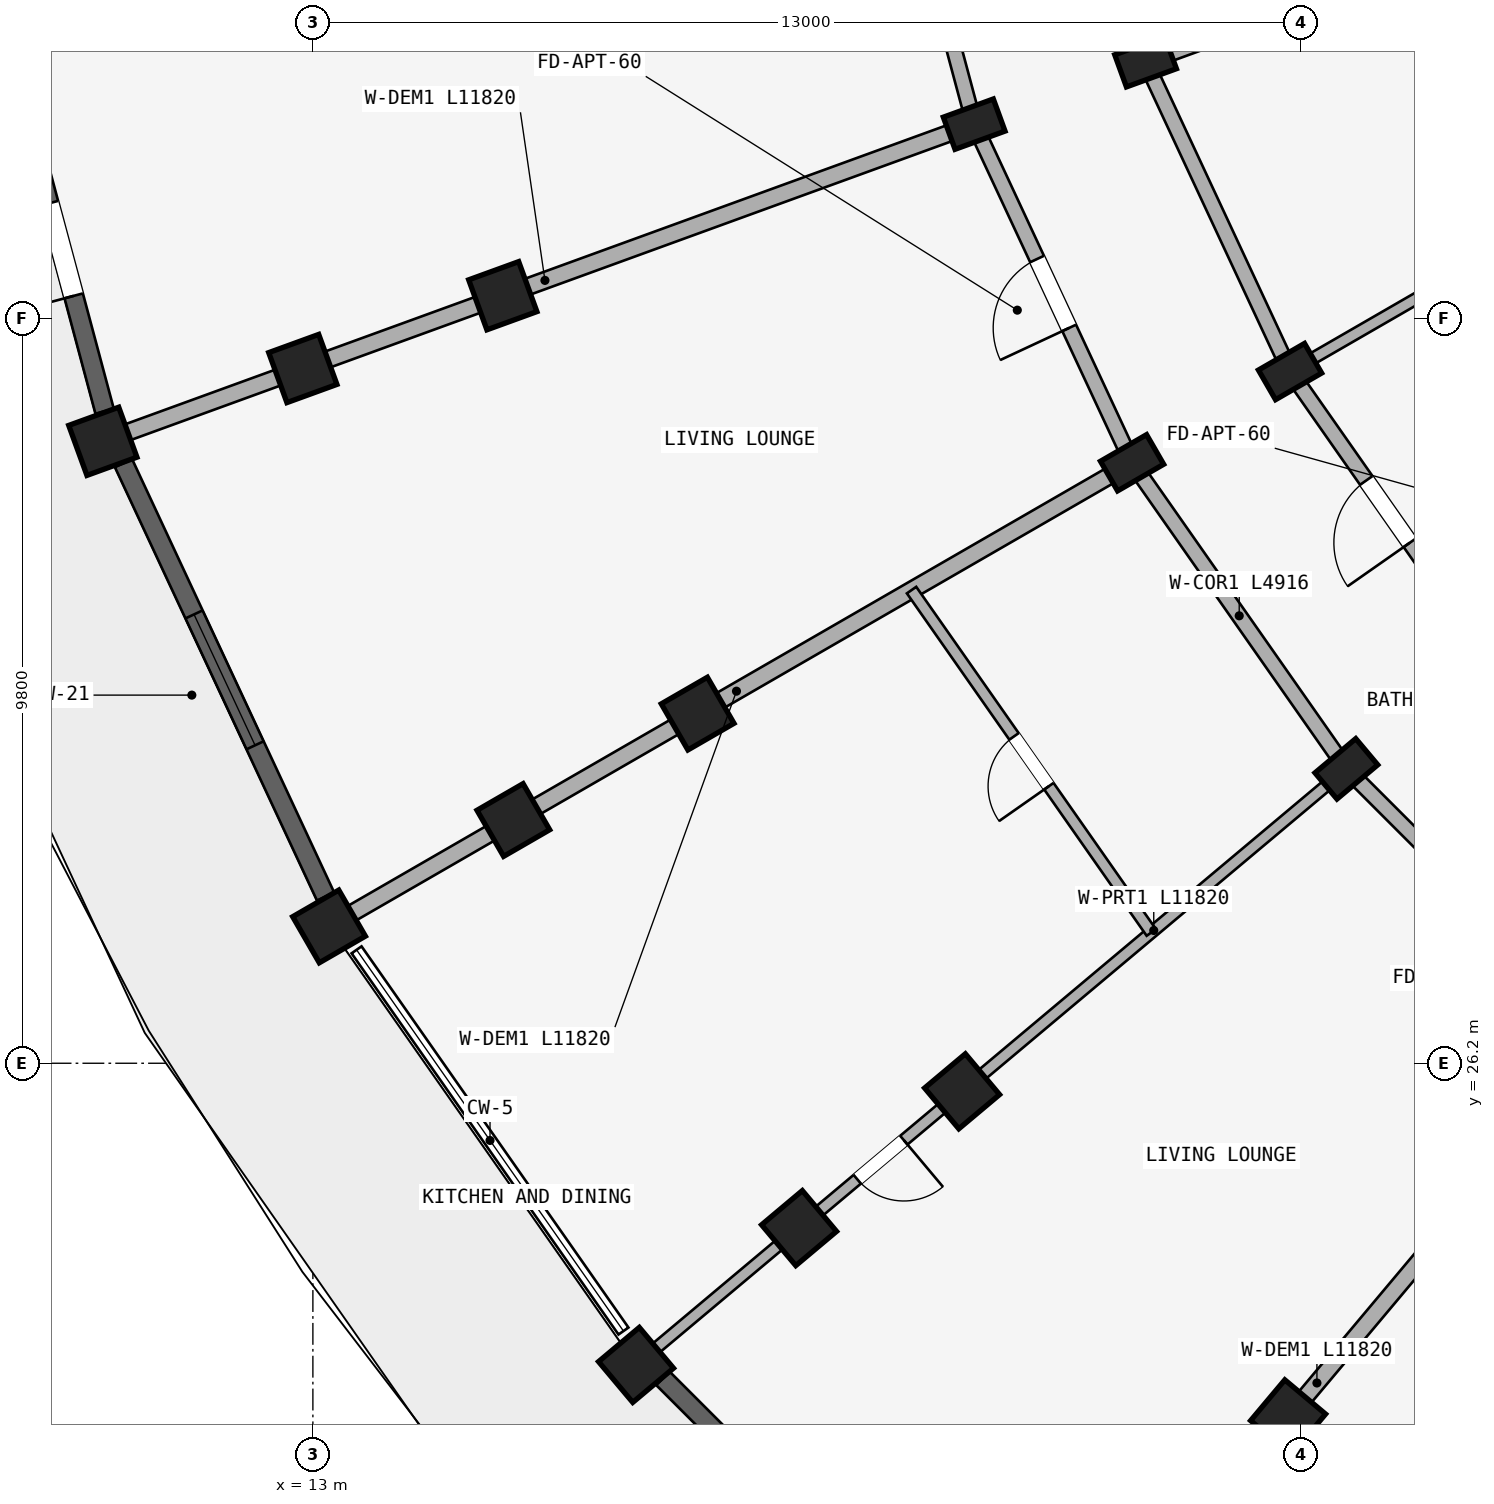
"""IFC4 building model, lengths in metres.
Left out: names, types, materials, properties, quantities, classifications, styles, units other than length and angle.
Written with IfcOpenShell. Run it as: python <this file> out.ifc"""

import sys

from ifc_helpers import new_model, si_unit, direction, frame, frame_2d, origin, origin_2d, place, context, subcontext, project, spatial, rectangle, extrude, element, fill, save


model = new_model("IFC4")
c1 = context("Model", 3, precision=1e-05, world=origin(), true_north=direction((0.0, 1.0)))
c2 = subcontext(c1, "Body", "Model", "MODEL_VIEW")
j1 = project(units=[si_unit("LENGTHUNIT", "METRE"), si_unit("PLANEANGLEUNIT", "RADIAN")], contexts=[c1])
p1 = place(None, origin())
s1 = spatial("IfcSite", under=j1, at=p1, CompositionType="ELEMENT")
p2 = place(p1, origin())
s2 = spatial("IfcBuilding", under=s1, at=p2, CompositionType="ELEMENT")
p3 = place(p2, frame((0.0, 0.0, 24.45)))
s3 = spatial("IfcBuildingStorey", under=s2, at=p3, CompositionType="ELEMENT", Elevation=24.45)
p4 = place(p3, frame((25.831, 21.542, 0.0), z_axis=(0.0, 0.0, 1.0), x_axis=(-0.766044443119, 0.642787609687, 0.0)))
e1 = element("IfcColumn", 1, at=p4, inside=s3, PredefinedType="COLUMN", context=c2, shape_type="SweptSolid", body=[
    extrude(rectangle(XDim=0.7, YDim=0.7, at=origin_2d()), origin(), (0.0, 0.0, 1.0), 2.93),
])
p5 = place(p3, frame((26.598, 30.073, 0.0), z_axis=(0.0, 0.0, 1.0), x_axis=(-0.642787609687, 0.766044443119, 0.0)))
e2 = element("IfcColumn", 2, at=p5, inside=s3, PredefinedType="COLUMN", context=c2, shape_type="SweptSolid", body=[
    extrude(rectangle(XDim=0.45, YDim=0.7, at=origin_2d()), origin(), (0.0, 0.0, 1.0), 2.93),
])
for number, where, z_axis, x_axis in (
    (3, (21.542, 25.831, 0.0), (0.0, 0.0, 1.0), (-0.643, 0.766, 0.0)),
    (4, (19.397, 24.031, 0.0), (0.0, 0.0, 1.0), (-0.643, 0.766, 0.0)),
):
    element("IfcColumn", number, at=place(p3, frame(where, z_axis=z_axis, x_axis=x_axis)), inside=s3, PredefinedType="COLUMN", context=c2, shape_type="SweptSolid", body=[
        extrude(rectangle(XDim=0.7, YDim=0.7, at=origin_2d()), origin(), (0.0, 0.0, 1.0), 2.93),
    ])
p6 = place(p3, frame((17.252, 22.231, 0.0), z_axis=(0.0, 0.0, 1.0), x_axis=(-0.642787609687, 0.766044443119, 0.0)))
e5 = element("IfcColumn", 5, at=p6, inside=s3, PredefinedType="COLUMN", context=c2, shape_type="SweptSolid", body=[
    extrude(rectangle(XDim=0.7, YDim=0.7, at=origin_2d()), origin(), (0.0, 0.0, 1.0), 2.97),
])
for number, where, z_axis, x_axis in (
    (6, (25.856, 35.3, 0.0), (0.0, 0.0, 1.0), (-0.5, 0.866, 0.0)),
    (7, (23.778, 34.1, 0.0), (0.0, 0.0, 1.0), (-0.5, 0.866, 0.0)),
):
    element("IfcColumn", number, at=place(p3, frame(where, z_axis=z_axis, x_axis=x_axis)), inside=s3, PredefinedType="COLUMN", context=c2, shape_type="SweptSolid", body=[
        extrude(rectangle(XDim=0.45, YDim=0.7, at=origin_2d()), origin(), (0.0, 0.0, 1.0), 2.93),
    ])
for number, where, z_axis, x_axis in (
    (8, (18.062, 30.8, 0.0), (0.0, 0.0, 1.0), (-0.5, 0.866, 0.0)),
    (9, (15.637, 29.4, 0.0), (0.0, 0.0, 1.0), (-0.5, 0.866, 0.0)),
):
    element("IfcColumn", number, at=place(p3, frame(where, z_axis=z_axis, x_axis=x_axis)), inside=s3, PredefinedType="COLUMN", context=c2, shape_type="SweptSolid", body=[
        extrude(rectangle(XDim=0.7, YDim=0.7, at=origin_2d()), origin(), (0.0, 0.0, 1.0), 2.93),
    ])
p7 = place(p3, frame((13.213, 28.0, 0.0), z_axis=(0.0, 0.0, 1.0), x_axis=(-0.5, 0.866025403784, 0.0)))
e10 = element("IfcColumn", 10, at=p7, inside=s3, PredefinedType="COLUMN", context=c2, shape_type="SweptSolid", body=[
    extrude(rectangle(XDim=0.7, YDim=0.7, at=origin_2d()), origin(), (0.0, 0.0, 1.0), 2.97),
])
for number, where, z_axis, x_axis in (
    (11, (23.956, 39.376, 0.0), (0.0, 0.0, 1.0), (-0.342, 0.94, 0.0)),
    (12, (21.701, 38.555, 0.0), (0.0, 0.0, 1.0), (-0.342, 0.94, 0.0)),
):
    element("IfcColumn", number, at=place(p3, frame(where, z_axis=z_axis, x_axis=x_axis)), inside=s3, PredefinedType="COLUMN", context=c2, shape_type="SweptSolid", body=[
        extrude(rectangle(XDim=0.45, YDim=0.7, at=origin_2d()), origin(), (0.0, 0.0, 1.0), 2.93),
    ])
for number, where, z_axis, x_axis in (
    (13, (15.499, 36.298, 0.0), (0.0, 0.0, 1.0), (-0.342, 0.94, 0.0)),
    (14, (12.868, 35.34, 0.0), (0.0, 0.0, 1.0), (-0.342, 0.94, 0.0)),
):
    element("IfcColumn", number, at=place(p3, frame(where, z_axis=z_axis, x_axis=x_axis)), inside=s3, PredefinedType="COLUMN", context=c2, shape_type="SweptSolid", body=[
        extrude(rectangle(XDim=0.7, YDim=0.7, at=origin_2d()), origin(), (0.0, 0.0, 1.0), 2.93),
    ])
p8 = place(p3, frame((10.236, 34.382, 0.0), z_axis=(0.0, 0.0, 1.0), x_axis=(-0.342020143326, 0.939692620786, 0.0)))
e15 = element("IfcColumn", 15, at=p8, inside=s3, PredefinedType="COLUMN", context=c2, shape_type="SweptSolid", body=[
    extrude(rectangle(XDim=0.7, YDim=0.7, at=origin_2d()), origin(), (0.0, 0.0, 1.0), 2.97),
])
p9 = place(p3, frame((30.073, 26.598, 0.0), z_axis=(0.0, 0.0, 1.0), x_axis=(-0.707106781187, 0.707106781187, 0.0)))
e16 = element("IfcWall", 16, at=p9, inside=s3, PredefinedType="STANDARD", context=c2, shape_type="SweptSolid", body=[
    extrude(rectangle(XDim=4.916, YDim=0.2, at=frame_2d((2.458, 0.0))), origin(), (0.0, 0.0, 1.0), 2.372),
])
p10 = place(p9, frame((1.888, 0.0, 0.0)))
e17 = element("IfcOpeningElement", 17, at=p10, cuts=e16, PredefinedType="OPENING", context=c2, shape_type="SweptSolid", body=[
    extrude(rectangle(XDim=1.14, YDim=2.15, at=frame_2d((0.57, 1.075))), frame((0.0, 0.11, 0.0), z_axis=(0.0, -1.0, 0.0), x_axis=(1.0, 0.0, 0.0)), (0.0, 0.0, 1.0), 0.22),
])
p11 = place(p3, frame((28.436, 31.616, 0.0), z_axis=(0.0, 0.0, 1.0), x_axis=(-0.573571637217, 0.819155404658, 0.0)))
e18 = element("IfcWall", 18, at=p11, inside=s3, PredefinedType="STANDARD", context=c2, shape_type="SweptSolid", body=[
    extrude(rectangle(XDim=4.497, YDim=0.2, at=frame_2d((2.249, 0.0))), origin(), (0.0, 0.0, 1.0), 2.372),
])
p12 = place(p11, frame((1.749, 0.0, 0.0)))
e19 = element("IfcOpeningElement", 19, at=p12, cuts=e18, PredefinedType="OPENING", context=c2, shape_type="SweptSolid", body=[
    extrude(rectangle(XDim=1.0, YDim=2.15, at=frame_2d((0.5, 1.075))), frame((0.0, 0.11, 0.0), z_axis=(0.0, -1.0, 0.0), x_axis=(1.0, 0.0, 0.0)), (0.0, 0.0, 1.0), 0.22),
])
p13 = place(p3, frame((26.598, 30.073, 0.0), z_axis=(0.0, 0.0, 1.0), x_axis=(-0.573592335331, 0.819140911474, 0.0)))
e20 = element("IfcWall", 20, at=p13, inside=s3, PredefinedType="STANDARD", context=c2, shape_type="SweptSolid", body=[
    extrude(rectangle(XDim=4.916, YDim=0.2, at=frame_2d((2.458, 0.0))), origin(), (0.0, 0.0, 1.0), 2.372),
])
p14 = place(p3, frame((25.856, 35.3, 0.0), z_axis=(0.0, 0.0, 1.0), x_axis=(-0.422617978463, 0.906307919131, 0.0)))
e21 = element("IfcWall", 21, at=p14, inside=s3, PredefinedType="STANDARD", context=c2, shape_type="SweptSolid", body=[
    extrude(rectangle(XDim=4.497, YDim=0.2, at=frame_2d((2.249, 0.0))), origin(), (0.0, 0.0, 1.0), 2.372),
])
p15 = place(p3, frame((23.778, 34.1, 0.0), z_axis=(0.0, 0.0, 1.0), x_axis=(-0.422629854778, 0.906302381024, 0.0)))
e22 = element("IfcWall", 22, at=p15, inside=s3, PredefinedType="STANDARD", context=c2, shape_type="SweptSolid", body=[
    extrude(rectangle(XDim=4.915, YDim=0.2, at=frame_2d((2.458, 0.0))), origin(), (0.0, 0.0, 1.0), 2.372),
])
p16 = place(p15, frame((1.958, 0.0, 0.0)))
e23 = element("IfcOpeningElement", 23, at=p16, cuts=e22, PredefinedType="OPENING", context=c2, shape_type="SweptSolid", body=[
    extrude(rectangle(XDim=1.0, YDim=2.15, at=frame_2d((0.5, 1.075))), frame((0.0, 0.11, 0.0), z_axis=(0.0, -1.0, 0.0), x_axis=(1.0, 0.0, 0.0)), (0.0, 0.0, 1.0), 0.22),
])
p17 = place(p3, frame((23.956, 39.376, 0.0), z_axis=(0.0, 0.0, 1.0), x_axis=(-0.258787642463, 0.965934240054, 0.0)))
e24 = element("IfcWall", 24, at=p17, inside=s3, PredefinedType="STANDARD", context=c2, shape_type="SweptSolid", body=[
    extrude(rectangle(XDim=4.497, YDim=0.2, at=frame_2d((2.249, 0.0))), origin(), (0.0, 0.0, 1.0), 2.372),
])
p18 = place(p17, frame((1.729, 0.0, 0.0)))
e25 = element("IfcOpeningElement", 25, at=p18, cuts=e24, PredefinedType="OPENING", context=c2, shape_type="SweptSolid", body=[
    extrude(rectangle(XDim=1.04, YDim=2.15, at=frame_2d((0.52, 1.075))), frame((0.0, 0.11, 0.0), z_axis=(0.0, -1.0, 0.0), x_axis=(1.0, 0.0, 0.0)), (0.0, 0.0, 1.0), 0.22),
])
p19 = place(p3, frame((21.701, 38.555, 0.0), z_axis=(0.0, 0.0, 1.0), x_axis=(-0.258803112091, 0.965930095386, 0.0)))
e26 = element("IfcWall", 26, at=p19, inside=s3, PredefinedType="STANDARD", context=c2, shape_type="SweptSolid", body=[
    extrude(rectangle(XDim=4.916, YDim=0.2, at=frame_2d((2.458, 0.0))), origin(), (0.0, 0.0, 1.0), 2.372),
])
p20 = place(p19, frame((1.938, 0.0, 0.0)))
e27 = element("IfcOpeningElement", 27, at=p20, cuts=e26, PredefinedType="OPENING", context=c2, shape_type="SweptSolid", body=[
    extrude(rectangle(XDim=1.04, YDim=2.15, at=frame_2d((0.52, 1.075))), frame((0.0, 0.11, 0.0), z_axis=(0.0, -1.0, 0.0), x_axis=(1.0, 0.0, 0.0)), (0.0, 0.0, 1.0), 0.22),
])
p21 = place(p3, frame((30.009, 26.521, 0.0), z_axis=(0.0, 0.0, 1.0), x_axis=(-0.642781220531, -0.766049804211, 0.0)))
e28 = element("IfcWall", 28, at=p21, inside=s3, PredefinedType="STANDARD", context=c2, shape_type="SweptSolid", body=[
    extrude(rectangle(XDim=11.82, YDim=0.22, at=frame_2d((5.91, 0.0))), origin(), (0.0, 0.0, 1.0), 2.372),
])
p22 = place(p3, frame((26.521, 30.009, 0.0), z_axis=(0.0, 0.0, 1.0), x_axis=(-0.766049804211, -0.642781220531, 0.0)))
e29 = element("IfcWall", 29, at=p22, inside=s3, PredefinedType="PARTITIONING", context=c2, shape_type="SweptSolid", body=[
    extrude(rectangle(XDim=11.82, YDim=0.15, at=frame_2d((5.91, 0.0))), origin(), (0.0, 0.0, 1.0), 2.372),
])
p23 = place(p22, frame((7.5, 0.0, 0.0)))
e30 = element("IfcOpeningElement", 30, at=p23, cuts=e29, PredefinedType="OPENING", context=c2, shape_type="SweptSolid", body=[
    extrude(rectangle(XDim=0.8, YDim=2.1, at=frame_2d((0.4, 1.05))), frame((0.0, 0.085, 0.0), z_axis=(0.0, -1.0, 0.0), x_axis=(1.0, 0.0, 0.0)), (0.0, 0.0, 1.0), 0.17),
])
p24 = place(p3, frame((31.746, 38.7, 0.0), z_axis=(0.0, 0.0, 1.0), x_axis=(-0.866026575979, -0.499997969693, 0.0)))
e31 = element("IfcWall", 31, at=p24, inside=s3, PredefinedType="PARTITIONING", context=c2, shape_type="SweptSolid", body=[
    extrude(rectangle(XDim=6.75, YDim=0.15, at=frame_2d((3.375, 0.0))), origin(), (0.0, 0.0, 1.0), 2.372),
])
p25 = place(p24, frame((3.222, 0.0, 0.0)))
e32 = element("IfcOpeningElement", 32, at=p25, cuts=e31, PredefinedType="OPENING", context=c2, shape_type="SweptSolid", body=[
    extrude(rectangle(XDim=0.98, YDim=2.12, at=frame_2d((0.49, 1.06))), frame((0.0, 0.085, 0.0), z_axis=(0.0, -1.0, 0.0), x_axis=(1.0, 0.0, 0.0)), (0.0, 0.0, 1.0), 0.17),
])
p26 = place(p3, frame((23.691, 34.05, 0.0), z_axis=(0.0, 0.0, 1.0), x_axis=(-0.866017730655, -0.500013290014, 0.0)))
e33 = element("IfcWall", 33, at=p26, inside=s3, PredefinedType="STANDARD", context=c2, shape_type="SweptSolid", body=[
    extrude(rectangle(XDim=11.82, YDim=0.22, at=frame_2d((5.91, 0.0))), origin(), (0.0, 0.0, 1.0), 2.372),
])
p27 = place(p3, frame((30.346, 41.702, 0.0), z_axis=(0.0, 0.0, 1.0), x_axis=(-0.939696231917, -0.342010221662, 0.0)))
e34 = element("IfcWall", 34, at=p27, inside=s3, PredefinedType="STANDARD", context=c2, shape_type="SweptSolid", body=[
    extrude(rectangle(XDim=6.75, YDim=0.22, at=frame_2d((3.375, 0.0))), origin(), (0.0, 0.0, 1.0), 2.372),
])
p28 = place(p3, frame((21.607, 38.521, 0.0), z_axis=(0.0, 0.0, 1.0), x_axis=(-0.939698102693, -0.342005081534, 0.0)))
e35 = element("IfcWall", 35, at=p28, inside=s3, PredefinedType="STANDARD", context=c2, shape_type="SweptSolid", body=[
    extrude(rectangle(XDim=11.82, YDim=0.22, at=frame_2d((5.91, 0.0))), origin(), (0.0, 0.0, 1.0), 2.372),
])
p29 = place(p3, frame((24.031, 27.92, 0.0), z_axis=(0.0, 0.0, 1.0), x_axis=(-0.573569599955, 0.819156831143, 0.0)))
e36 = element("IfcWall", 36, at=p29, inside=s3, PredefinedType="PLUMBINGWALL", context=c2, shape_type="SweptSolid", body=[
    extrude(rectangle(XDim=5.5, YDim=0.15, at=frame_2d((2.75, 0.0))), origin(), (0.0, 0.0, 1.0), 2.372),
])
p30 = place(p29, frame((2.35, 0.0, 0.0)))
e37 = element("IfcOpeningElement", 37, at=p30, cuts=e36, PredefinedType="OPENING", context=c2, shape_type="SweptSolid", body=[
    extrude(rectangle(XDim=0.8, YDim=2.1, at=frame_2d((0.4, 1.05))), frame((0.0, 0.085, 0.0), z_axis=(0.0, -1.0, 0.0), x_axis=(1.0, 0.0, 0.0)), (0.0, 0.0, 1.0), 0.17),
])
p31 = place(p3, frame((22.054, 17.606, 0.0), z_axis=(0.0, 0.0, 1.0), x_axis=(-0.707106781187, 0.707106781187, 0.0)))
e38 = element("IfcWall", 38, at=p31, inside=s3, PredefinedType="STANDARD", context=c2, shape_type="SweptSolid", body=[
    extrude(rectangle(XDim=6.291, YDim=0.25, at=frame_2d((3.145, 0.0))), origin(), (0.0, 0.0, 1.0), 2.412),
])
p32 = place(p31, frame((4.043, 0.0, 0.562)))
e39 = element("IfcOpeningElement", 39, at=p32, cuts=e38, PredefinedType="OPENING", context=c2, shape_type="SweptSolid", body=[
    extrude(rectangle(XDim=1.2, YDim=1.5, at=frame_2d((0.6, 0.75))), frame((0.0, 0.135, 0.0), z_axis=(0.0, -1.0, 0.0), x_axis=(1.0, 0.0, 0.0)), (0.0, 0.0, 1.0), 0.27),
])
p33 = place(p31, frame((1.572, 0.0, 0.0)))
e40 = element("IfcOpeningElement", 40, at=p33, cuts=e38, PredefinedType="OPENING", context=c2, shape_type="SweptSolid", body=[
    extrude(rectangle(XDim=1.26, YDim=2.15, at=frame_2d((0.63, 1.075))), frame((0.0, 0.135, 0.0), z_axis=(0.0, -1.0, 0.0), x_axis=(1.0, 0.0, 0.0)), (0.0, 0.0, 1.0), 0.27),
])
p34 = place(p3, frame((13.167, 28.394, 0.0), z_axis=(0.0, 0.0, 1.0), x_axis=(-0.42262622775, 0.906304072383, 0.0)))
e41 = element("IfcWall", 41, at=p34, inside=s3, PredefinedType="STANDARD", context=c2, shape_type="SweptSolid", body=[
    extrude(rectangle(XDim=6.29, YDim=0.25, at=frame_2d((3.145, 0.0))), origin(), (0.0, 0.0, 1.0), 2.412),
])
p35 = place(p34, frame((2.195, 0.0, 0.462)))
e42 = element("IfcOpeningElement", 42, at=p35, cuts=e41, PredefinedType="OPENING", context=c2, shape_type="SweptSolid", body=[
    extrude(rectangle(XDim=1.9, YDim=1.75, at=frame_2d((0.95, 0.875))), frame((0.0, 0.135, 0.0), z_axis=(0.0, -1.0, 0.0), x_axis=(1.0, 0.0, 0.0)), (0.0, 0.0, 1.0), 0.27),
])
p36 = place(p3, frame((10.26, 34.778, 0.0), z_axis=(0.0, 0.0, 1.0), x_axis=(-0.258792990912, 0.965932807112, 0.0)))
e43 = element("IfcWall", 43, at=p36, inside=s3, PredefinedType="STANDARD", context=c2, shape_type="SweptSolid", body=[
    extrude(rectangle(XDim=6.291, YDim=0.25, at=frame_2d((3.145, 0.0))), origin(), (0.0, 0.0, 1.0), 2.412),
])
p37 = place(p36, frame((4.043, 0.0, 0.562)))
e44 = element("IfcOpeningElement", 44, at=p37, cuts=e43, PredefinedType="OPENING", context=c2, shape_type="SweptSolid", body=[
    extrude(rectangle(XDim=1.2, YDim=1.5, at=frame_2d((0.6, 0.75))), frame((0.0, 0.135, 0.0), z_axis=(0.0, -1.0, 0.0), x_axis=(1.0, 0.0, 0.0)), (0.0, 0.0, 1.0), 0.27),
])
p38 = place(p36, frame((1.572, 0.0, 0.0)))
e45 = element("IfcOpeningElement", 45, at=p38, cuts=e43, PredefinedType="OPENING", context=c2, shape_type="SweptSolid", body=[
    extrude(rectangle(XDim=1.26, YDim=2.15, at=frame_2d((0.63, 1.075))), frame((0.0, 0.135, 0.0), z_axis=(0.0, -1.0, 0.0), x_axis=(1.0, 0.0, 0.0)), (0.0, 0.0, 1.0), 0.27),
])
p39 = place(p35, origin())
e46 = element("IfcWindow", 46, at=p39, inside=s3, PartitioningType="DOUBLE_PANEL_VERTICAL", PredefinedType="WINDOW", context=c2, shape_type="SweptSolid", body=[
    extrude(rectangle(XDim=1.9, YDim=1.75, at=frame_2d((0.95, 0.875))), frame((0.0, 0.03, 0.0), z_axis=(0.0, -1.0, 0.0), x_axis=(1.0, 0.0, 0.0)), (0.0, 0.0, 1.0), 0.06),
])
fill(e42, e46)
p40 = place(p23, origin())
e47 = element("IfcDoor", 47, at=p40, inside=s3, OperationType="SINGLE_SWING_LEFT", PredefinedType="DOOR", context=c2, shape_type="SweptSolid", body=[
    extrude(rectangle(XDim=0.8, YDim=2.1, at=frame_2d((0.4, 1.05))), frame((0.0, 0.025, 0.0), z_axis=(0.0, -1.0, 0.0), x_axis=(1.0, 0.0, 0.0)), (0.0, 0.0, 1.0), 0.05),
])
fill(e30, e47)
p41 = place(p30, origin())
e48 = element("IfcDoor", 48, at=p41, inside=s3, OperationType="SINGLE_SWING_LEFT", PredefinedType="DOOR", context=c2, shape_type="SweptSolid", body=[
    extrude(rectangle(XDim=0.8, YDim=2.1, at=frame_2d((0.4, 1.05))), frame((0.0, 0.025, 0.0), z_axis=(0.0, -1.0, 0.0), x_axis=(1.0, 0.0, 0.0)), (0.0, 0.0, 1.0), 0.05),
])
fill(e37, e48)
p42 = place(p16, frame((1.0, 0.0, 0.0), z_axis=(0.0, 0.0, 1.0), x_axis=(-1.0, 0.0, 0.0)))
e49 = element("IfcDoor", 49, at=p42, inside=s3, OperationType="SINGLE_SWING_RIGHT", PredefinedType="DOOR", context=c2, shape_type="SweptSolid", body=[
    extrude(rectangle(XDim=1.0, YDim=2.15, at=frame_2d((0.5, 1.075))), frame((0.0, 0.025, 0.0), z_axis=(0.0, -1.0, 0.0), x_axis=(1.0, 0.0, 0.0)), (0.0, 0.0, 1.0), 0.05),
])
fill(e23, e49)
p43 = place(p12, origin())
e50 = element("IfcDoor", 50, at=p43, inside=s3, OperationType="SINGLE_SWING_LEFT", PredefinedType="DOOR", context=c2, shape_type="SweptSolid", body=[
    extrude(rectangle(XDim=1.0, YDim=2.15, at=frame_2d((0.5, 1.075))), frame((0.0, 0.025, 0.0), z_axis=(0.0, -1.0, 0.0), x_axis=(1.0, 0.0, 0.0)), (0.0, 0.0, 1.0), 0.05),
])
fill(e19, e50)
p44 = place(p38, origin())
e51 = element("IfcDoor", 51, at=p44, inside=s3, OperationType="SINGLE_SWING_LEFT", PredefinedType="DOOR", context=c2, shape_type="SweptSolid", body=[
    extrude(rectangle(XDim=1.26, YDim=2.15, at=frame_2d((0.63, 1.075))), frame((0.0, 0.025, 0.0), z_axis=(0.0, -1.0, 0.0), x_axis=(1.0, 0.0, 0.0)), (0.0, 0.0, 1.0), 0.05),
])
fill(e45, e51)
save(model, sys.argv[1])
